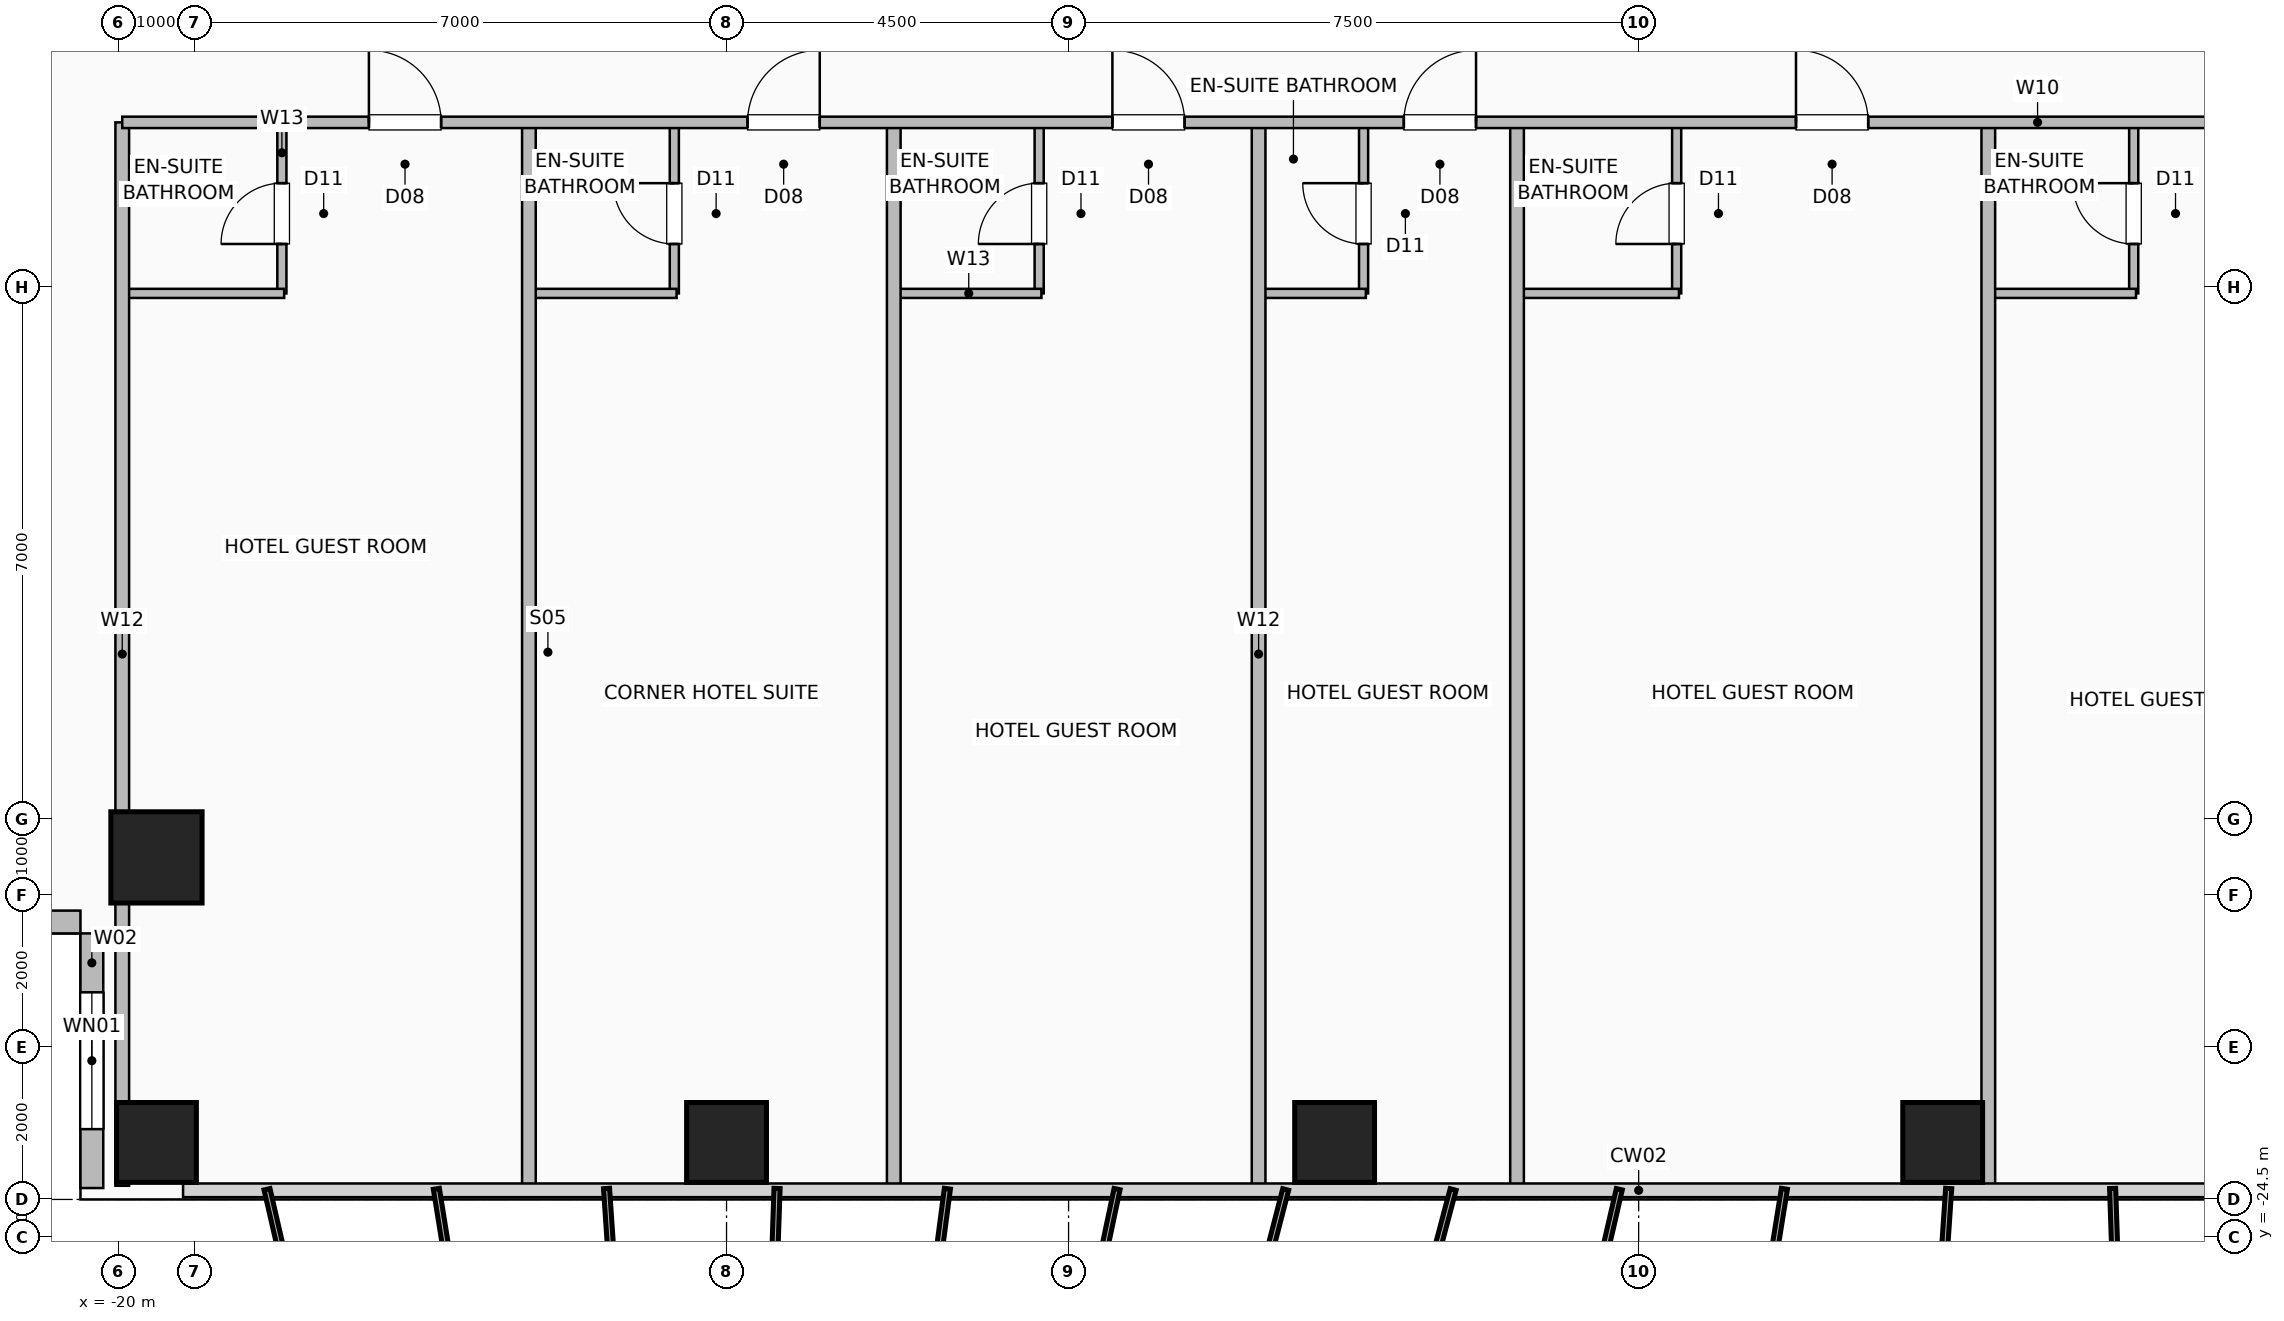
"""IFC4 building model, lengths in metres.
Left out: names, types, materials, properties, quantities, classifications, styles, units other than length and angle.
Written with IfcOpenShell. Run it as: python <this file> out.ifc"""

import sys

from ifc_helpers import new_model, si_unit, direction, frame, frame_2d, origin, origin_2d, place, context, subcontext, project, spatial, rectangle, hollow_rectangle, extrude, element, fill, save


model = new_model("IFC4")
c1 = context("Model", 3, precision=1e-05, world=origin(), true_north=direction((0.0, 1.0)))
c2 = subcontext(c1, "Body", "Model", "MODEL_VIEW")
j1 = project(units=[si_unit("LENGTHUNIT", "METRE"), si_unit("PLANEANGLEUNIT", "RADIAN")], contexts=[c1])
p1 = place(None, origin())
s1 = spatial("IfcSite", under=j1, at=p1, CompositionType="ELEMENT")
p2 = place(p1, origin())
s2 = spatial("IfcBuilding", under=s1, at=p2, CompositionType="ELEMENT")
p3 = place(p2, frame((0.0, 0.0, 58.5)))
s3 = spatial("IfcBuildingStorey", under=s2, at=p3, CompositionType="ELEMENT", Elevation=58.5)
for number, where, z_axis, x_axis in (
    (1, (-19.5, -23.25, 0.0), (0.0, 0.0, 1.0), (1.0, 0.0, 0.0)),
    (2, (-12.0, -23.25, 0.0), (0.0, 0.0, 1.0), (1.0, 0.0, 0.0)),
    (3, (-4.0, -23.25, 0.0), (0.0, 0.0, 1.0), (1.0, 0.0, 0.0)),
    (4, (4.0, -23.25, 0.0), (0.0, 0.0, 1.0), (1.0, 0.0, 0.0)),
):
    element("IfcColumn", number, at=place(p3, frame(where, z_axis=z_axis, x_axis=x_axis)), inside=s3, PredefinedType="COLUMN", context=c2, shape_type="SweptSolid", body=[
        extrude(hollow_rectangle(XDim=1.05, YDim=1.05, WallThickness=0.05, at=origin_2d()), origin(), (0.0, 0.0, 1.0), 3.5),
    ])
p4 = place(p3, frame((-19.5, -19.5, 0.0), z_axis=(0.0, 0.0, 1.0), x_axis=(1.0, 0.0, 0.0)))
e5 = element("IfcColumn", 5, at=p4, inside=s3, PredefinedType="COLUMN", context=c2, shape_type="SweptSolid", body=[
    extrude(hollow_rectangle(XDim=1.2, YDim=1.2, WallThickness=0.055, at=origin_2d()), origin(), (0.0, 0.0, 1.0), 3.5),
])
p5 = place(p3, frame((-20.35, -23.85, 0.0), z_axis=(0.0, 0.0, 1.0), x_axis=(0.0, 1.0, 0.0)))
e6 = element("IfcWall", 6, at=p5, inside=s3, PredefinedType="SOLIDWALL", context=c2, shape_type="SweptSolid", body=[
    extrude(rectangle(XDim=3.35, YDim=0.3, at=frame_2d((1.675, 0.0))), origin(), (0.0, 0.0, 1.0), 3.25),
])
p6 = place(p5, frame((0.775, 0.0, 0.9)))
e7 = element("IfcOpeningElement", 7, at=p6, cuts=e6, PredefinedType="OPENING", context=c2, shape_type="SweptSolid", body=[
    extrude(rectangle(XDim=1.8, YDim=1.8, at=frame_2d((0.9, 0.9))), frame((0.0, 0.16, 0.0), z_axis=(0.0, -1.0, 0.0), x_axis=(1.0, 0.0, 0.0)), (0.0, 0.0, 1.0), 0.32),
])
p7 = place(p3, frame((-23.85, -20.35, 0.0), z_axis=(0.0, 0.0, 1.0), x_axis=(1.0, 0.0, 0.0)))
e8 = element("IfcWall", 8, at=p7, inside=s3, PredefinedType="SOLIDWALL", context=c2, shape_type="SweptSolid", body=[
    extrude(rectangle(XDim=3.35, YDim=0.3, at=frame_2d((1.675, 0.0))), origin(), (0.0, 0.0, 1.0), 3.25),
])
p8 = place(p3, frame((-17.85, -12.08, 0.0), z_axis=(0.0, 0.0, 1.0), x_axis=(0.0, 1.0, 0.0)))
e9 = element("IfcWall", 9, at=p8, inside=s3, PredefinedType="PLUMBINGWALL", context=c2, shape_type="SweptSolid", body=[
    extrude(rectangle(XDim=2.25, YDim=0.12, at=frame_2d((1.125, 0.0))), origin(), (0.0, 0.0, 1.0), 3.25),
])
p9 = place(p8, frame((0.65, 0.0, 0.0)))
e10 = element("IfcOpeningElement", 10, at=p9, cuts=e9, PredefinedType="OPENING", context=c2, shape_type="SweptSolid", body=[
    extrude(rectangle(XDim=0.8, YDim=2.05, at=frame_2d((0.4, 1.025))), frame((0.0, 0.07, 0.0), z_axis=(0.0, -1.0, 0.0), x_axis=(1.0, 0.0, 0.0)), (0.0, 0.0, 1.0), 0.14),
])
p10 = place(p3, frame((-19.92, -12.08, 0.0), z_axis=(0.0, 0.0, 1.0), x_axis=(1.0, 0.0, 0.0)))
e11 = element("IfcWall", 11, at=p10, inside=s3, PredefinedType="PLUMBINGWALL", context=c2, shape_type="SweptSolid", body=[
    extrude(rectangle(XDim=2.1, YDim=0.12, at=frame_2d((1.05, 0.0))), origin(), (0.0, 0.0, 1.0), 3.25),
])
p11 = place(p3, frame((-12.687, -12.08, 0.0), z_axis=(0.0, 0.0, 1.0), x_axis=(0.0, 1.0, 0.0)))
e12 = element("IfcWall", 12, at=p11, inside=s3, PredefinedType="PLUMBINGWALL", context=c2, shape_type="SweptSolid", body=[
    extrude(rectangle(XDim=2.25, YDim=0.12, at=frame_2d((1.125, 0.0))), origin(), (0.0, 0.0, 1.0), 3.25),
])
p12 = place(p11, frame((0.65, 0.0, 0.0)))
e13 = element("IfcOpeningElement", 13, at=p12, cuts=e12, PredefinedType="OPENING", context=c2, shape_type="SweptSolid", body=[
    extrude(rectangle(XDim=0.8, YDim=2.05, at=frame_2d((0.4, 1.025))), frame((0.0, 0.07, 0.0), z_axis=(0.0, -1.0, 0.0), x_axis=(1.0, 0.0, 0.0)), (0.0, 0.0, 1.0), 0.14),
])
p13 = place(p3, frame((-14.57, -12.08, 0.0), z_axis=(0.0, 0.0, 1.0), x_axis=(1.0, 0.0, 0.0)))
e14 = element("IfcWall", 14, at=p13, inside=s3, PredefinedType="PLUMBINGWALL", context=c2, shape_type="SweptSolid", body=[
    extrude(rectangle(XDim=1.913, YDim=0.12, at=frame_2d((0.957, 0.0))), origin(), (0.0, 0.0, 1.0), 3.25),
])
p14 = place(p3, frame((-7.887, -12.08, 0.0), z_axis=(0.0, 0.0, 1.0), x_axis=(0.0, 1.0, 0.0)))
e15 = element("IfcWall", 15, at=p14, inside=s3, PredefinedType="PLUMBINGWALL", context=c2, shape_type="SweptSolid", body=[
    extrude(rectangle(XDim=2.25, YDim=0.12, at=frame_2d((1.125, 0.0))), origin(), (0.0, 0.0, 1.0), 3.25),
])
p15 = place(p14, frame((0.65, 0.0, 0.0)))
e16 = element("IfcOpeningElement", 16, at=p15, cuts=e15, PredefinedType="OPENING", context=c2, shape_type="SweptSolid", body=[
    extrude(rectangle(XDim=0.8, YDim=2.05, at=frame_2d((0.4, 1.025))), frame((0.0, 0.07, 0.0), z_axis=(0.0, -1.0, 0.0), x_axis=(1.0, 0.0, 0.0)), (0.0, 0.0, 1.0), 0.14),
])
p16 = place(p3, frame((-9.77, -12.08, 0.0), z_axis=(0.0, 0.0, 1.0), x_axis=(1.0, 0.0, 0.0)))
e17 = element("IfcWall", 17, at=p16, inside=s3, PredefinedType="PLUMBINGWALL", context=c2, shape_type="SweptSolid", body=[
    extrude(rectangle(XDim=1.913, YDim=0.12, at=frame_2d((0.957, 0.0))), origin(), (0.0, 0.0, 1.0), 3.25),
])
p17 = place(p3, frame((-3.619, -12.08, 0.0), z_axis=(0.0, 0.0, 1.0), x_axis=(0.0, 1.0, 0.0)))
e18 = element("IfcWall", 18, at=p17, inside=s3, PredefinedType="PLUMBINGWALL", context=c2, shape_type="SweptSolid", body=[
    extrude(rectangle(XDim=2.25, YDim=0.12, at=frame_2d((1.125, 0.0))), origin(), (0.0, 0.0, 1.0), 3.25),
])
p18 = place(p17, frame((0.65, 0.0, 0.0)))
e19 = element("IfcOpeningElement", 19, at=p18, cuts=e18, PredefinedType="OPENING", context=c2, shape_type="SweptSolid", body=[
    extrude(rectangle(XDim=0.8, YDim=2.05, at=frame_2d((0.4, 1.025))), frame((0.0, 0.07, 0.0), z_axis=(0.0, -1.0, 0.0), x_axis=(1.0, 0.0, 0.0)), (0.0, 0.0, 1.0), 0.14),
])
p19 = place(p3, frame((-4.97, -12.08, 0.0), z_axis=(0.0, 0.0, 1.0), x_axis=(1.0, 0.0, 0.0)))
e20 = element("IfcWall", 20, at=p19, inside=s3, PredefinedType="PLUMBINGWALL", context=c2, shape_type="SweptSolid", body=[
    extrude(rectangle(XDim=1.381, YDim=0.12, at=frame_2d((0.69, 0.0))), origin(), (0.0, 0.0, 1.0), 3.25),
])
p20 = place(p3, frame((0.5, -12.08, 0.0), z_axis=(0.0, 0.0, 1.0), x_axis=(0.0, 1.0, 0.0)))
e21 = element("IfcWall", 21, at=p20, inside=s3, PredefinedType="PLUMBINGWALL", context=c2, shape_type="SweptSolid", body=[
    extrude(rectangle(XDim=2.25, YDim=0.12, at=frame_2d((1.125, 0.0))), origin(), (0.0, 0.0, 1.0), 3.25),
])
p21 = place(p20, frame((0.65, 0.0, 0.0)))
e22 = element("IfcOpeningElement", 22, at=p21, cuts=e21, PredefinedType="OPENING", context=c2, shape_type="SweptSolid", body=[
    extrude(rectangle(XDim=0.8, YDim=2.05, at=frame_2d((0.4, 1.025))), frame((0.0, 0.07, 0.0), z_axis=(0.0, -1.0, 0.0), x_axis=(1.0, 0.0, 0.0)), (0.0, 0.0, 1.0), 0.14),
])
p22 = place(p3, frame((-1.57, -12.08, 0.0), z_axis=(0.0, 0.0, 1.0), x_axis=(1.0, 0.0, 0.0)))
e23 = element("IfcWall", 23, at=p22, inside=s3, PredefinedType="PLUMBINGWALL", context=c2, shape_type="SweptSolid", body=[
    extrude(rectangle(XDim=2.1, YDim=0.12, at=frame_2d((1.05, 0.0))), origin(), (0.0, 0.0, 1.0), 3.25),
])
p23 = place(p3, frame((6.513, -12.08, 0.0), z_axis=(0.0, 0.0, 1.0), x_axis=(0.0, 1.0, 0.0)))
e24 = element("IfcWall", 24, at=p23, inside=s3, PredefinedType="PLUMBINGWALL", context=c2, shape_type="SweptSolid", body=[
    extrude(rectangle(XDim=2.25, YDim=0.12, at=frame_2d((1.125, 0.0))), origin(), (0.0, 0.0, 1.0), 3.25),
])
p24 = place(p23, frame((0.65, 0.0, 0.0)))
e25 = element("IfcOpeningElement", 25, at=p24, cuts=e24, PredefinedType="OPENING", context=c2, shape_type="SweptSolid", body=[
    extrude(rectangle(XDim=0.8, YDim=2.05, at=frame_2d((0.4, 1.025))), frame((0.0, 0.07, 0.0), z_axis=(0.0, -1.0, 0.0), x_axis=(1.0, 0.0, 0.0)), (0.0, 0.0, 1.0), 0.14),
])
p25 = place(p3, frame((4.63, -12.08, 0.0), z_axis=(0.0, 0.0, 1.0), x_axis=(1.0, 0.0, 0.0)))
e26 = element("IfcWall", 26, at=p25, inside=s3, PredefinedType="PLUMBINGWALL", context=c2, shape_type="SweptSolid", body=[
    extrude(rectangle(XDim=1.913, YDim=0.12, at=frame_2d((0.957, 0.0))), origin(), (0.0, 0.0, 1.0), 3.25),
])
for number, where, z_axis, x_axis in (
    (27, (-19.95, -23.82, 0.0), (0.0, 0.0, 1.0), (0.0, 1.0, 0.0)),
    (28, (-14.6, -23.82, 0.0), (0.0, 0.0, 1.0), (0.0, 1.0, 0.0)),
    (29, (-9.8, -23.82, 0.0), (0.0, 0.0, 1.0), (0.0, 1.0, 0.0)),
    (30, (-5.0, -23.82, 0.0), (0.0, 0.0, 1.0), (0.0, 1.0, 0.0)),
    (31, (-1.6, -23.82, 0.0), (0.0, 0.0, 1.0), (0.0, 1.0, 0.0)),
    (32, (4.6, -23.82, 0.0), (0.0, 0.0, 1.0), (0.0, 1.0, 0.0)),
):
    element("IfcWall", number, at=place(p3, frame(where, z_axis=z_axis, x_axis=x_axis)), inside=s3, PredefinedType="PARTITIONING", context=c2, shape_type="SweptSolid", body=[
        extrude(rectangle(XDim=13.99, YDim=0.18, at=frame_2d((6.995, 0.0))), origin(), (0.0, 0.0, 1.0), 3.25),
    ])
p26 = place(p3, frame((-19.95, -9.83, 0.0), z_axis=(0.0, 0.0, 1.0), x_axis=(1.0, 0.0, 0.0)))
e33 = element("IfcWall", 33, at=p26, inside=s3, PredefinedType="PARTITIONING", context=c2, shape_type="SweptSolid", body=[
    extrude(rectangle(XDim=39.9, YDim=0.15, at=frame_2d((19.95, 0.0))), origin(), (0.0, 0.0, 1.0), 3.25),
])
p27 = place(p26, frame((3.245, 0.0, 0.0)))
e34 = element("IfcOpeningElement", 34, at=p27, cuts=e33, PredefinedType="OPENING", context=c2, shape_type="SweptSolid", body=[
    extrude(rectangle(XDim=0.95, YDim=2.08, at=frame_2d((0.475, 1.04))), frame((0.0, 0.085, 0.0), z_axis=(0.0, -1.0, 0.0), x_axis=(1.0, 0.0, 0.0)), (0.0, 0.0, 1.0), 0.17),
])
p28 = place(p26, frame((8.227, 0.0, 0.0)))
e35 = element("IfcOpeningElement", 35, at=p28, cuts=e33, PredefinedType="OPENING", context=c2, shape_type="SweptSolid", body=[
    extrude(rectangle(XDim=0.95, YDim=2.08, at=frame_2d((0.475, 1.04))), frame((0.0, 0.085, 0.0), z_axis=(0.0, -1.0, 0.0), x_axis=(1.0, 0.0, 0.0)), (0.0, 0.0, 1.0), 0.17),
])
p29 = place(p26, frame((13.027, 0.0, 0.0)))
e36 = element("IfcOpeningElement", 36, at=p29, cuts=e33, PredefinedType="OPENING", context=c2, shape_type="SweptSolid", body=[
    extrude(rectangle(XDim=0.95, YDim=2.08, at=frame_2d((0.475, 1.04))), frame((0.0, 0.085, 0.0), z_axis=(0.0, -1.0, 0.0), x_axis=(1.0, 0.0, 0.0)), (0.0, 0.0, 1.0), 0.17),
])
p30 = place(p26, frame((16.861, 0.0, 0.0)))
e37 = element("IfcOpeningElement", 37, at=p30, cuts=e33, PredefinedType="OPENING", context=c2, shape_type="SweptSolid", body=[
    extrude(rectangle(XDim=0.95, YDim=2.08, at=frame_2d((0.475, 1.04))), frame((0.0, 0.085, 0.0), z_axis=(0.0, -1.0, 0.0), x_axis=(1.0, 0.0, 0.0)), (0.0, 0.0, 1.0), 0.17),
])
p31 = place(p26, frame((22.02, 0.0, 0.0)))
e38 = element("IfcOpeningElement", 38, at=p31, cuts=e33, PredefinedType="OPENING", context=c2, shape_type="SweptSolid", body=[
    extrude(rectangle(XDim=0.95, YDim=2.08, at=frame_2d((0.475, 1.04))), frame((0.0, 0.085, 0.0), z_axis=(0.0, -1.0, 0.0), x_axis=(1.0, 0.0, 0.0)), (0.0, 0.0, 1.0), 0.17),
])
p32 = place(p26, frame((27.427, 0.0, 0.0)))
e39 = element("IfcOpeningElement", 39, at=p32, cuts=e33, PredefinedType="OPENING", context=c2, shape_type="SweptSolid", body=[
    extrude(rectangle(XDim=0.95, YDim=2.08, at=frame_2d((0.475, 1.04))), frame((0.0, 0.085, 0.0), z_axis=(0.0, -1.0, 0.0), x_axis=(1.0, 0.0, 0.0)), (0.0, 0.0, 1.0), 0.17),
])
p33 = place(p26, frame((32.365, 0.0, 0.0)))
e40 = element("IfcOpeningElement", 40, at=p33, cuts=e33, PredefinedType="OPENING", context=c2, shape_type="SweptSolid", body=[
    extrude(rectangle(XDim=0.95, YDim=2.08, at=frame_2d((0.475, 1.04))), frame((0.0, 0.085, 0.0), z_axis=(0.0, -1.0, 0.0), x_axis=(1.0, 0.0, 0.0)), (0.0, 0.0, 1.0), 0.17),
])
p34 = place(p26, frame((37.695, 0.0, 0.0)))
e41 = element("IfcOpeningElement", 41, at=p34, cuts=e33, PredefinedType="OPENING", context=c2, shape_type="SweptSolid", body=[
    extrude(rectangle(XDim=0.95, YDim=2.08, at=frame_2d((0.475, 1.04))), frame((0.0, 0.085, 0.0), z_axis=(0.0, -1.0, 0.0), x_axis=(1.0, 0.0, 0.0)), (0.0, 0.0, 1.0), 0.17),
])
p35 = place(p6, origin())
e42 = element("IfcWindow", 42, at=p35, inside=s3, PartitioningType="SINGLE_PANEL", PredefinedType="WINDOW", context=c2, shape_type="SweptSolid", body=[
    extrude(rectangle(XDim=1.8, YDim=1.8, at=frame_2d((0.9, 0.9))), frame((0.0, 0.03, 0.0), z_axis=(0.0, -1.0, 0.0), x_axis=(1.0, 0.0, 0.0)), (0.0, 0.0, 1.0), 0.06),
])
fill(e7, e42)
p36 = place(p9, origin())
e43 = element("IfcDoor", 43, at=p36, inside=s3, OperationType="SINGLE_SWING_LEFT", PredefinedType="DOOR", context=c2, shape_type="SweptSolid", body=[
    extrude(rectangle(XDim=0.8, YDim=2.05, at=frame_2d((0.4, 1.025))), frame((0.0, 0.025, 0.0), z_axis=(0.0, -1.0, 0.0), x_axis=(1.0, 0.0, 0.0)), (0.0, 0.0, 1.0), 0.05),
])
fill(e10, e43)
p37 = place(p12, origin())
e44 = element("IfcDoor", 44, at=p37, inside=s3, OperationType="SINGLE_SWING_RIGHT", PredefinedType="DOOR", context=c2, shape_type="SweptSolid", body=[
    extrude(rectangle(XDim=0.8, YDim=2.05, at=frame_2d((0.4, 1.025))), frame((0.0, 0.025, 0.0), z_axis=(0.0, -1.0, 0.0), x_axis=(1.0, 0.0, 0.0)), (0.0, 0.0, 1.0), 0.05),
])
fill(e13, e44)
p38 = place(p15, origin())
e45 = element("IfcDoor", 45, at=p38, inside=s3, OperationType="SINGLE_SWING_LEFT", PredefinedType="DOOR", context=c2, shape_type="SweptSolid", body=[
    extrude(rectangle(XDim=0.8, YDim=2.05, at=frame_2d((0.4, 1.025))), frame((0.0, 0.025, 0.0), z_axis=(0.0, -1.0, 0.0), x_axis=(1.0, 0.0, 0.0)), (0.0, 0.0, 1.0), 0.05),
])
fill(e16, e45)
p39 = place(p18, origin())
e46 = element("IfcDoor", 46, at=p39, inside=s3, OperationType="SINGLE_SWING_RIGHT", PredefinedType="DOOR", context=c2, shape_type="SweptSolid", body=[
    extrude(rectangle(XDim=0.8, YDim=2.05, at=frame_2d((0.4, 1.025))), frame((0.0, 0.025, 0.0), z_axis=(0.0, -1.0, 0.0), x_axis=(1.0, 0.0, 0.0)), (0.0, 0.0, 1.0), 0.05),
])
fill(e19, e46)
p40 = place(p21, origin())
e47 = element("IfcDoor", 47, at=p40, inside=s3, OperationType="SINGLE_SWING_LEFT", PredefinedType="DOOR", context=c2, shape_type="SweptSolid", body=[
    extrude(rectangle(XDim=0.8, YDim=2.05, at=frame_2d((0.4, 1.025))), frame((0.0, 0.025, 0.0), z_axis=(0.0, -1.0, 0.0), x_axis=(1.0, 0.0, 0.0)), (0.0, 0.0, 1.0), 0.05),
])
fill(e22, e47)
p41 = place(p24, origin())
e48 = element("IfcDoor", 48, at=p41, inside=s3, OperationType="SINGLE_SWING_RIGHT", PredefinedType="DOOR", context=c2, shape_type="SweptSolid", body=[
    extrude(rectangle(XDim=0.8, YDim=2.05, at=frame_2d((0.4, 1.025))), frame((0.0, 0.025, 0.0), z_axis=(0.0, -1.0, 0.0), x_axis=(1.0, 0.0, 0.0)), (0.0, 0.0, 1.0), 0.05),
])
fill(e25, e48)
p42 = place(p27, origin())
e49 = element("IfcDoor", 49, at=p42, inside=s3, OperationType="SINGLE_SWING_LEFT", PredefinedType="DOOR", context=c2, shape_type="SweptSolid", body=[
    extrude(rectangle(XDim=0.95, YDim=2.08, at=frame_2d((0.475, 1.04))), frame((0.0, 0.025, 0.0), z_axis=(0.0, -1.0, 0.0), x_axis=(1.0, 0.0, 0.0)), (0.0, 0.0, 1.0), 0.05),
])
fill(e34, e49)
p43 = place(p28, origin())
e50 = element("IfcDoor", 50, at=p43, inside=s3, OperationType="SINGLE_SWING_RIGHT", PredefinedType="DOOR", context=c2, shape_type="SweptSolid", body=[
    extrude(rectangle(XDim=0.95, YDim=2.08, at=frame_2d((0.475, 1.04))), frame((0.0, 0.025, 0.0), z_axis=(0.0, -1.0, 0.0), x_axis=(1.0, 0.0, 0.0)), (0.0, 0.0, 1.0), 0.05),
])
fill(e35, e50)
p44 = place(p29, origin())
e51 = element("IfcDoor", 51, at=p44, inside=s3, OperationType="SINGLE_SWING_LEFT", PredefinedType="DOOR", context=c2, shape_type="SweptSolid", body=[
    extrude(rectangle(XDim=0.95, YDim=2.08, at=frame_2d((0.475, 1.04))), frame((0.0, 0.025, 0.0), z_axis=(0.0, -1.0, 0.0), x_axis=(1.0, 0.0, 0.0)), (0.0, 0.0, 1.0), 0.05),
])
fill(e36, e51)
p45 = place(p30, origin())
e52 = element("IfcDoor", 52, at=p45, inside=s3, OperationType="SINGLE_SWING_RIGHT", PredefinedType="DOOR", context=c2, shape_type="SweptSolid", body=[
    extrude(rectangle(XDim=0.95, YDim=2.08, at=frame_2d((0.475, 1.04))), frame((0.0, 0.025, 0.0), z_axis=(0.0, -1.0, 0.0), x_axis=(1.0, 0.0, 0.0)), (0.0, 0.0, 1.0), 0.05),
])
fill(e37, e52)
p46 = place(p31, origin())
e53 = element("IfcDoor", 53, at=p46, inside=s3, OperationType="SINGLE_SWING_LEFT", PredefinedType="DOOR", context=c2, shape_type="SweptSolid", body=[
    extrude(rectangle(XDim=0.95, YDim=2.08, at=frame_2d((0.475, 1.04))), frame((0.0, 0.025, 0.0), z_axis=(0.0, -1.0, 0.0), x_axis=(1.0, 0.0, 0.0)), (0.0, 0.0, 1.0), 0.05),
])
fill(e38, e53)
save(model, sys.argv[1])
